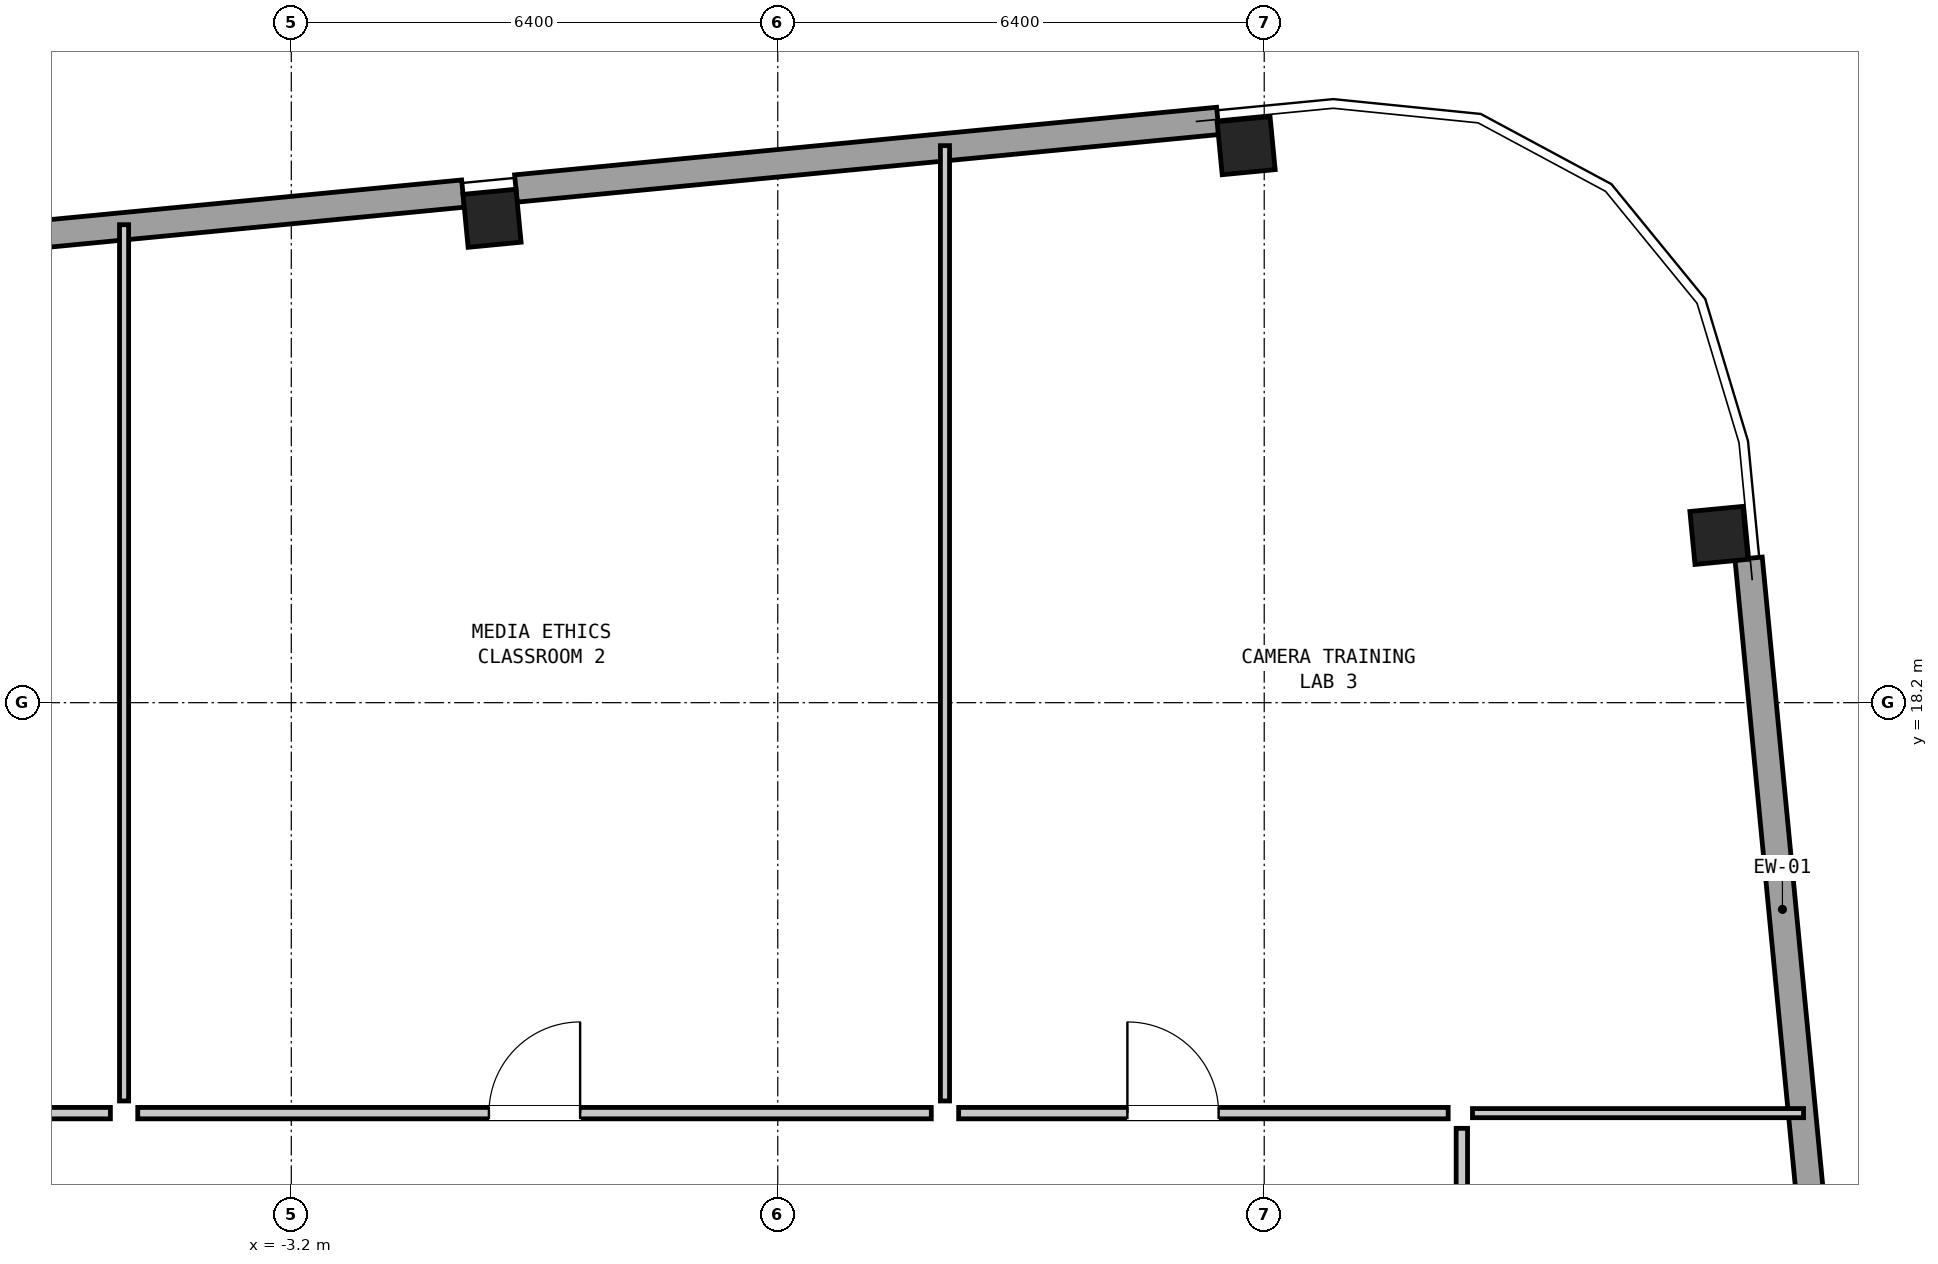
"""IFC4 building model, lengths in metres.
Left out: names, types, materials, properties, quantities, classifications, styles, units other than length and angle.
Written with IfcOpenShell. Run it as: python <this file> out.ifc"""

import sys

from ifc_helpers import new_model, si_unit, direction, frame, frame_2d, origin, origin_2d, place, context, subcontext, project, spatial, rectangle, hollow_rectangle, extrude, element, fill, save


model = new_model("IFC4")
c1 = context("Model", 3, precision=1e-05, world=origin(), true_north=direction((0.0, 1.0)))
c2 = subcontext(c1, "Body", "Model", "MODEL_VIEW")
j1 = project(units=[si_unit("LENGTHUNIT", "METRE"), si_unit("PLANEANGLEUNIT", "RADIAN")], contexts=[c1])
p1 = place(None, origin())
s1 = spatial("IfcSite", under=j1, at=p1, CompositionType="ELEMENT")
p2 = place(p1, origin())
s2 = spatial("IfcBuilding", under=s1, at=p2, CompositionType="ELEMENT")
p3 = place(p2, frame((0.0, 0.0, 180.55)))
s3 = spatial("IfcBuildingStorey", under=s2, at=p3, CompositionType="ELEMENT", Elevation=180.55)
for number, where, z_axis, x_axis in (
    (1, (15.582, 20.4, 0.0), (0.0, 0.0, 1.0), (-0.096, 0.995, 0.0)),
    (2, (9.362, 25.528, 0.0), (0.0, 0.0, 1.0), (0.995, 0.096, 0.0)),
    (3, (-0.559, 24.573, 0.0), (0.0, 0.0, 1.0), (0.995, 0.096, 0.0)),
):
    element("IfcColumn", number, at=place(p3, frame(where, z_axis=z_axis, x_axis=x_axis)), inside=s3, PredefinedType="COLUMN", context=c2, shape_type="SweptSolid", body=[
        extrude(hollow_rectangle(XDim=0.7, YDim=0.7, WallThickness=0.045, at=origin_2d()), origin(), (0.0, 0.0, 1.0), 3.05),
    ])
p4 = place(p3, frame((15.973, 20.098, 0.0), z_axis=(0.0, 0.0, 1.0), x_axis=(0.095829727039, -0.995397741315, 0.0)))
e4 = element("IfcWall", 4, at=p4, inside=s3, PredefinedType="SOLIDWALL", context=c2, shape_type="SweptSolid", body=[
    extrude(rectangle(XDim=9.279, YDim=0.36, at=frame_2d((4.639, 0.0))), origin(), (0.0, 0.0, 1.0), 0.95),
])
p5 = place(p3, frame((-10.166, 24.009, 0.0), z_axis=(0.0, 0.0, 1.0), x_axis=(0.995396180318, 0.095845939971, 0.0)))
e5 = element("IfcWall", 5, at=p5, inside=s3, PredefinedType="SOLIDWALL", context=c2, shape_type="SweptSolid", body=[
    extrude(rectangle(XDim=9.267, YDim=0.36, at=frame_2d((4.633, 0.0))), origin(), (0.0, 0.0, 1.0), 0.95),
])
p6 = place(p3, frame((-0.245, 24.965, 0.0), z_axis=(0.0, 0.0, 1.0), x_axis=(0.995397741315, 0.095829727039, 0.0)))
e6 = element("IfcWall", 6, at=p6, inside=s3, PredefinedType="SOLIDWALL", context=c2, shape_type="SweptSolid", body=[
    extrude(rectangle(XDim=9.279, YDim=0.36, at=frame_2d((4.639, 0.0))), origin(), (0.0, 0.0, 1.0), 0.95),
])
p7 = place(p3, frame((12.34, 12.8, 0.0), z_axis=(0.0, 0.0, 1.0), x_axis=(1.0, 0.0, 0.0)))
e7 = element("IfcWall", 7, at=p7, inside=s3, PredefinedType="PARTITIONING", context=c2, shape_type="SweptSolid", body=[
    extrude(rectangle(XDim=4.355, YDim=0.12, at=frame_2d((2.178, 0.0))), origin(), (0.0, 0.0, 1.0), 2.83),
])
p8 = place(p3, frame((-5.4, 12.96, 0.0), z_axis=(0.0, 0.0, 1.0), x_axis=(0.0, 1.0, 0.0)))
e8 = element("IfcWall", 8, at=p8, inside=s3, PredefinedType="PARTITIONING", context=c2, shape_type="SweptSolid", body=[
    extrude(rectangle(XDim=11.528, YDim=0.12, at=frame_2d((5.764, 0.0))), origin(), (0.0, 0.0, 1.0), 2.83),
])
p9 = place(p3, frame((5.4, 12.96, 0.0), z_axis=(0.0, 0.0, 1.0), x_axis=(0.0, 1.0, 0.0)))
e9 = element("IfcWall", 9, at=p9, inside=s3, PredefinedType="PARTITIONING", context=c2, shape_type="SweptSolid", body=[
    extrude(rectangle(XDim=12.568, YDim=0.12, at=frame_2d((6.284, 0.0))), origin(), (0.0, 0.0, 1.0), 2.83),
])
p10 = place(p3, frame((-12.02, 12.8, 0.0), z_axis=(0.0, 0.0, 1.0), x_axis=(1.0, 0.0, 0.0)))
e10 = element("IfcWall", 10, at=p10, inside=s3, PredefinedType="PARTITIONING", context=c2, shape_type="SweptSolid", body=[
    extrude(rectangle(XDim=6.44, YDim=0.15, at=frame_2d((3.22, 0.0))), origin(), (0.0, 0.0, 1.0), 2.83),
])
p11 = place(p10, frame((3.02, 0.0, 0.0)))
e11 = element("IfcOpeningElement", 11, at=p11, cuts=e10, PredefinedType="OPENING", context=c2, shape_type="SweptSolid", body=[
    extrude(rectangle(XDim=1.2, YDim=2.1, at=frame_2d((0.6, 1.05))), frame((0.0, 0.087, 0.0), z_axis=(0.0, -1.0, 0.0), x_axis=(1.0, 0.0, 0.0)), (0.0, 0.0, 1.0), 0.174),
])
p12 = place(p3, frame((-5.22, 12.8, 0.0), z_axis=(0.0, 0.0, 1.0), x_axis=(1.0, 0.0, 0.0)))
e12 = element("IfcWall", 12, at=p12, inside=s3, PredefinedType="PARTITIONING", context=c2, shape_type="SweptSolid", body=[
    extrude(rectangle(XDim=10.44, YDim=0.15, at=frame_2d((5.22, 0.0))), origin(), (0.0, 0.0, 1.0), 2.83),
])
p13 = place(p12, frame((4.62, 0.0, 0.0)))
e13 = element("IfcOpeningElement", 13, at=p13, cuts=e12, PredefinedType="OPENING", context=c2, shape_type="SweptSolid", body=[
    extrude(rectangle(XDim=1.2, YDim=2.1, at=frame_2d((0.6, 1.05))), frame((0.0, 0.087, 0.0), z_axis=(0.0, -1.0, 0.0), x_axis=(1.0, 0.0, 0.0)), (0.0, 0.0, 1.0), 0.174),
])
p14 = place(p3, frame((5.58, 12.8, 0.0), z_axis=(0.0, 0.0, 1.0), x_axis=(1.0, 0.0, 0.0)))
e14 = element("IfcWall", 14, at=p14, inside=s3, PredefinedType="PARTITIONING", context=c2, shape_type="SweptSolid", body=[
    extrude(rectangle(XDim=6.44, YDim=0.15, at=frame_2d((3.22, 0.0))), origin(), (0.0, 0.0, 1.0), 2.83),
])
p15 = place(p14, frame((2.22, 0.0, 0.0)))
e15 = element("IfcOpeningElement", 15, at=p15, cuts=e14, PredefinedType="OPENING", context=c2, shape_type="SweptSolid", body=[
    extrude(rectangle(XDim=1.2, YDim=2.1, at=frame_2d((0.6, 1.05))), frame((0.0, 0.087, 0.0), z_axis=(0.0, -1.0, 0.0), x_axis=(1.0, 0.0, 0.0)), (0.0, 0.0, 1.0), 0.174),
])
p16 = place(p3, frame((12.2, 3.8, 0.0), z_axis=(0.0, 0.0, 1.0), x_axis=(0.0, 1.0, 0.0)))
e16 = element("IfcWall", 16, at=p16, inside=s3, PredefinedType="PARTITIONING", context=c2, shape_type="SweptSolid", body=[
    extrude(rectangle(XDim=8.8, YDim=0.15, at=frame_2d((4.4, 0.0))), origin(), (0.0, 0.0, 1.0), 2.83),
])
p17 = place(p16, frame((3.925, 0.0, 0.0)))
e17 = element("IfcOpeningElement", 17, at=p17, cuts=e16, PredefinedType="OPENING", context=c2, shape_type="SweptSolid", body=[
    extrude(rectangle(XDim=0.95, YDim=2.1, at=frame_2d((0.475, 1.05))), frame((0.0, 0.087, 0.0), z_axis=(0.0, -1.0, 0.0), x_axis=(1.0, 0.0, 0.0)), (0.0, 0.0, 1.0), 0.174),
])
p18 = place(p13, origin())
e18 = element("IfcDoor", 18, at=p18, inside=s3, OperationType="SINGLE_SWING_RIGHT", PredefinedType="DOOR", context=c2, shape_type="SweptSolid", body=[
    extrude(rectangle(XDim=1.2, YDim=2.1, at=frame_2d((0.6, 1.05))), frame((0.0, 0.025, 0.0), z_axis=(0.0, -1.0, 0.0), x_axis=(1.0, 0.0, 0.0)), (0.0, 0.0, 1.0), 0.05),
])
fill(e13, e18)
p19 = place(p15, origin())
e19 = element("IfcDoor", 19, at=p19, inside=s3, OperationType="SINGLE_SWING_LEFT", PredefinedType="DOOR", context=c2, shape_type="SweptSolid", body=[
    extrude(rectangle(XDim=1.2, YDim=2.1, at=frame_2d((0.6, 1.05))), frame((0.0, 0.025, 0.0), z_axis=(0.0, -1.0, 0.0), x_axis=(1.0, 0.0, 0.0)), (0.0, 0.0, 1.0), 0.05),
])
fill(e15, e19)
save(model, sys.argv[1])
